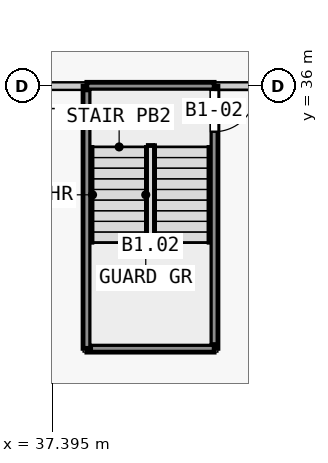
"""IFC4 building model, lengths in metres.
Left out: names, types, materials, properties, quantities, classifications, styles, units other than length and angle.
Written with IfcOpenShell. Run it as: python <this file> out.ifc"""

import sys

from ifc_helpers import new_model, si_unit, direction, frame, frame_2d, origin, place, context, subcontext, project, spatial, rectangle, extrude, element, fill, save


model = new_model("IFC4")
c1 = context("Model", 3, precision=1e-05, world=origin(), true_north=direction((0.0, 1.0)))
c2 = subcontext(c1, "Body", "Model", "MODEL_VIEW")
j1 = project(units=[si_unit("LENGTHUNIT", "METRE"), si_unit("PLANEANGLEUNIT", "RADIAN")], contexts=[c1])
p1 = place(None, origin())
s1 = spatial("IfcSite", under=j1, at=p1, CompositionType="ELEMENT")
p2 = place(p1, origin())
s2 = spatial("IfcBuilding", under=s1, at=p2, CompositionType="ELEMENT")
p3 = place(p2, frame((0.0, 0.0, -7.0)))
s3 = spatial("IfcBuildingStorey", under=s2, at=p3, CompositionType="ELEMENT", Elevation=-7.0)
p4 = place(p3, frame((38.3, 36.0, 0.0), z_axis=(0.0, 0.0, 1.0), x_axis=(-1.0, 0.0, 0.0)))
e1 = element("IfcWall", 1, at=p4, inside=s3, PredefinedType="PARTITIONING", context=c2, shape_type="SweptSolid", body=[
    extrude(rectangle(XDim=1.7, YDim=0.2, at=frame_2d((0.85, 0.0))), origin(), (0.0, 0.0, 1.0), 6.55),
])
p5 = place(p3, frame((44.4, 36.0, 0.0), z_axis=(0.0, 0.0, 1.0), x_axis=(-1.0, 0.0, 0.0)))
e2 = element("IfcWall", 2, at=p5, inside=s3, PredefinedType="PARTITIONING", context=c2, shape_type="SweptSolid", body=[
    extrude(rectangle(XDim=2.75, YDim=0.2, at=frame_2d((1.375, 0.0))), origin(), (0.0, 0.0, 1.0), 6.55),
])
p6 = place(p3, frame((41.65, 36.0, 0.0), z_axis=(0.0, 0.0, 1.0), x_axis=(0.0, -1.0, 0.0)))
e3 = element("IfcWall", 3, at=p6, inside=s3, PredefinedType="PARTITIONING", context=c2, shape_type="SweptSolid", body=[
    extrude(rectangle(XDim=6.9, YDim=0.2, at=frame_2d((3.45, 0.0))), origin(), (0.0, 0.0, 1.0), 6.55),
])
p7 = place(p6, frame((0.1, 0.0, 0.0)))
e4 = element("IfcOpeningElement", 4, at=p7, cuts=e3, PredefinedType="OPENING", context=c2, shape_type="SweptSolid", body=[
    extrude(rectangle(XDim=1.1, YDim=2.1, at=frame_2d((0.55, 1.05))), frame((0.0, 0.11, 0.0), z_axis=(0.0, -1.0, 0.0), x_axis=(1.0, 0.0, 0.0)), (0.0, 0.0, 1.0), 0.22),
])
p8 = place(p3, frame((41.65, 29.1, 0.0), z_axis=(0.0, 0.0, 1.0), x_axis=(-1.0, 0.0, 0.0)))
e5 = element("IfcWall", 5, at=p8, inside=s3, PredefinedType="PARTITIONING", context=c2, shape_type="SweptSolid", body=[
    extrude(rectangle(XDim=3.35, YDim=0.2, at=frame_2d((1.675, 0.0))), origin(), (0.0, 0.0, 1.0), 6.55),
])
p9 = place(p3, frame((38.3, 29.1, 0.0), z_axis=(0.0, 0.0, 1.0), x_axis=(0.0, 1.0, 0.0)))
e6 = element("IfcWall", 6, at=p9, inside=s3, PredefinedType="PARTITIONING", context=c2, shape_type="SweptSolid", body=[
    extrude(rectangle(XDim=6.9, YDim=0.2, at=frame_2d((3.45, 0.0))), origin(), (0.0, 0.0, 1.0), 6.55),
])
p10 = place(p3, frame((38.3, 36.0, 0.0), z_axis=(0.0, 0.0, 1.0), x_axis=(1.0, 0.0, 0.0)))
e7 = element("IfcWall", 7, at=p10, inside=s3, PredefinedType="PARTITIONING", context=c2, shape_type="SweptSolid", body=[
    extrude(rectangle(XDim=3.35, YDim=0.2, at=frame_2d((1.675, 0.0))), origin(), (0.0, 0.0, 1.0), 6.55),
])
p11 = place(p7, origin())
e8 = element("IfcDoor", 8, at=p11, inside=s3, OperationType="SINGLE_SWING_LEFT", PredefinedType="DOOR", context=c2, shape_type="SweptSolid", body=[
    extrude(rectangle(XDim=1.1, YDim=2.1, at=frame_2d((0.55, 1.05))), frame((0.0, 0.025, 0.0), z_axis=(0.0, -1.0, 0.0), x_axis=(1.0, 0.0, 0.0)), (0.0, 0.0, 1.0), 0.05),
])
fill(e4, e8)
save(model, sys.argv[1])
